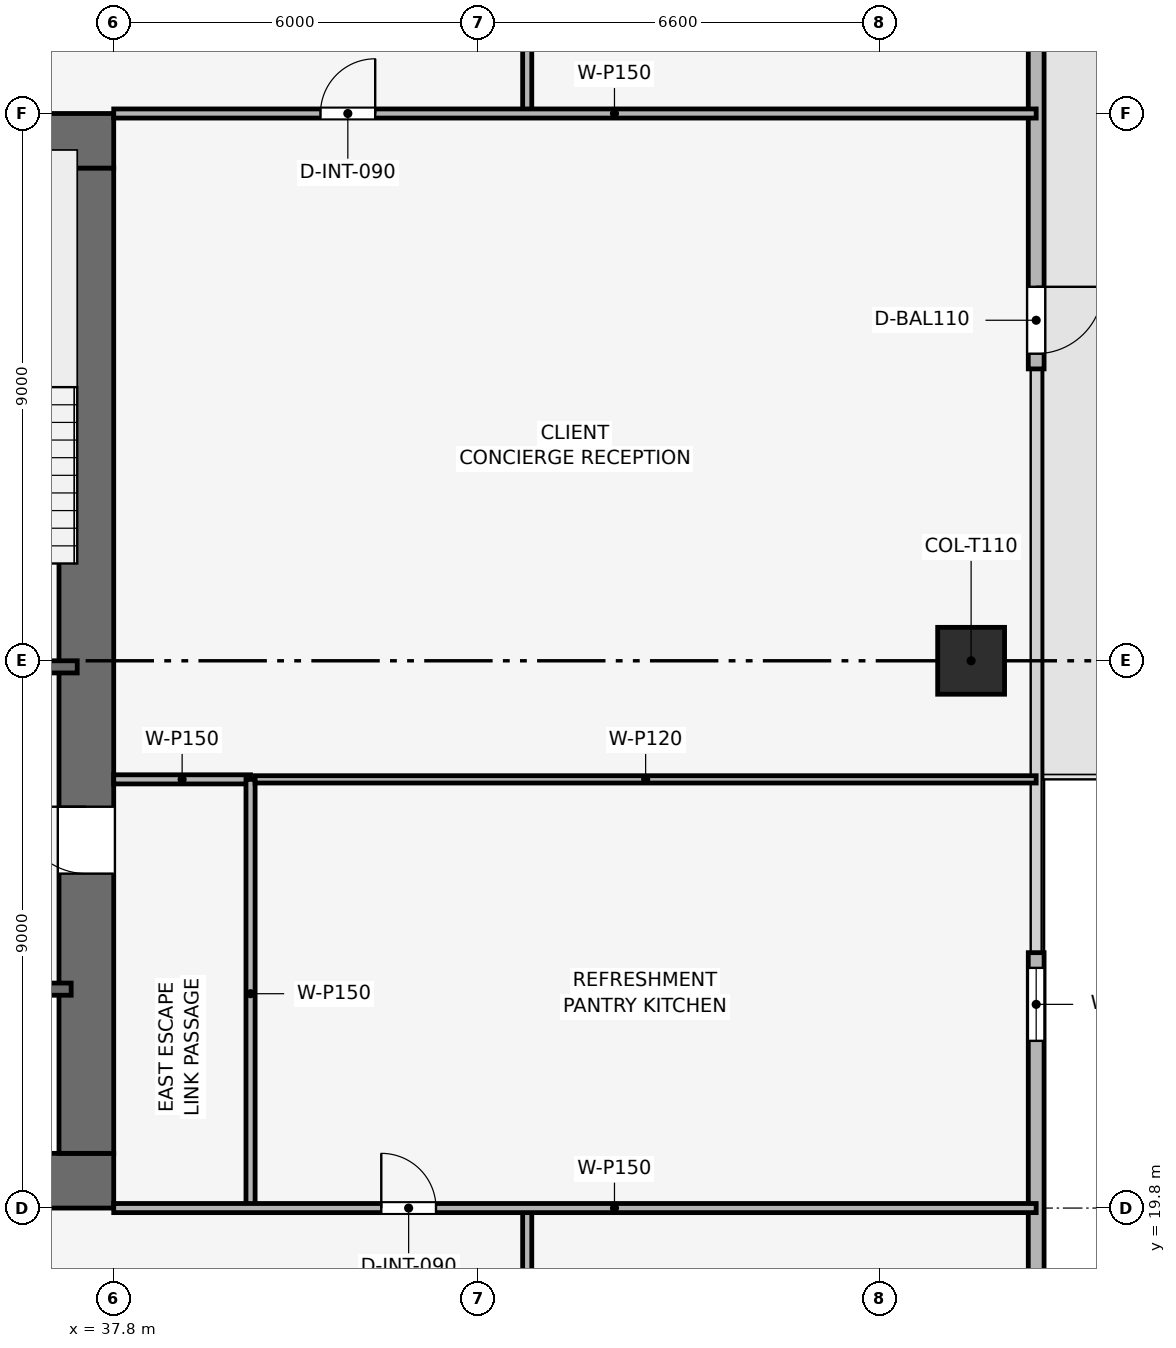
"""IFC4 building model, lengths in metres.
Left out: names, types, materials, properties, quantities, classifications, styles, units other than length and angle.
Written with IfcOpenShell. Run it as: python <this file> out.ifc"""

import sys

from ifc_helpers import new_model, si_unit, direction, frame, frame_2d, origin, origin_2d, place, context, subcontext, project, spatial, rectangle, extrude, element, fill, save


model = new_model("IFC4")
c1 = context("Model", 3, precision=1e-05, world=origin(), true_north=direction((0.0, 1.0)))
c2 = subcontext(c1, "Body", "Model", "MODEL_VIEW")
j1 = project(units=[si_unit("LENGTHUNIT", "METRE"), si_unit("PLANEANGLEUNIT", "RADIAN")], contexts=[c1])
p1 = place(None, origin())
s1 = spatial("IfcSite", under=j1, at=p1, CompositionType="ELEMENT")
p2 = place(p1, origin())
s2 = spatial("IfcBuilding", under=s1, at=p2, CompositionType="ELEMENT")
p3 = place(p2, frame((0.0, 0.0, 175.8)))
s3 = spatial("IfcBuildingStorey", under=s2, at=p3, CompositionType="ELEMENT", Elevation=175.8)
p4 = place(p3, frame((19.8, 20.25, 0.0), z_axis=(0.0, 0.0, 1.0), x_axis=(1.0, 0.0, 0.0)))
e1 = element("IfcWall", 1, at=p4, inside=s3, PredefinedType="SHEAR", context=c2, shape_type="SweptSolid", body=[
    extrude(rectangle(XDim=18.0, YDim=0.9, at=frame_2d((9.0, 0.0))), origin(), (0.0, 0.0, 1.0), 3.75),
])
p5 = place(p4, frame((8.4, 0.0, 0.0)))
e2 = element("IfcOpeningElement", 2, at=p5, cuts=e1, PredefinedType="OPENING", context=c2, shape_type="SweptSolid", body=[
    extrude(rectangle(XDim=1.2, YDim=2.2, at=frame_2d((0.6, 1.1))), frame((0.0, 0.46, 0.0), z_axis=(0.0, -1.0, 0.0), x_axis=(1.0, 0.0, 0.0)), (0.0, 0.0, 1.0), 0.92),
])
p6 = place(p3, frame((19.8, 37.35, 0.0), z_axis=(0.0, 0.0, 1.0), x_axis=(1.0, 0.0, 0.0)))
e3 = element("IfcWall", 3, at=p6, inside=s3, PredefinedType="SHEAR", context=c2, shape_type="SweptSolid", body=[
    extrude(rectangle(XDim=18.0, YDim=0.9, at=frame_2d((9.0, 0.0))), origin(), (0.0, 0.0, 1.0), 3.75),
])
p7 = place(p6, frame((7.05, 0.0, 0.0)))
e4 = element("IfcOpeningElement", 4, at=p7, cuts=e3, PredefinedType="OPENING", context=c2, shape_type="SweptSolid", body=[
    extrude(rectangle(XDim=1.1, YDim=2.15, at=frame_2d((0.55, 1.075))), frame((0.0, 0.46, 0.0), z_axis=(0.0, -1.0, 0.0), x_axis=(1.0, 0.0, 0.0)), (0.0, 0.0, 1.0), 0.92),
])
p8 = place(p3, frame((37.35, 20.7, 0.0), z_axis=(0.0, 0.0, 1.0), x_axis=(0.0, 1.0, 0.0)))
e5 = element("IfcWall", 5, at=p8, inside=s3, PredefinedType="SHEAR", context=c2, shape_type="SweptSolid", body=[
    extrude(rectangle(XDim=16.2, YDim=0.9, at=frame_2d((8.1, 0.0))), origin(), (0.0, 0.0, 1.0), 3.75),
])
p9 = place(p8, frame((4.6, 0.0, 0.0)))
e6 = element("IfcOpeningElement", 6, at=p9, cuts=e5, PredefinedType="OPENING", context=c2, shape_type="SweptSolid", body=[
    extrude(rectangle(XDim=1.1, YDim=2.15, at=frame_2d((0.55, 1.075))), frame((0.0, 0.46, 0.0), z_axis=(0.0, -1.0, 0.0), x_axis=(1.0, 0.0, 0.0)), (0.0, 0.0, 1.0), 0.92),
])
p10 = place(p3, frame((51.9, 28.8, 0.003), z_axis=(0.0, 0.0, 1.0), x_axis=(1.0, 0.0, 0.0)))
e7 = element("IfcColumn", 7, at=p10, inside=s3, PredefinedType="COLUMN", context=c2, shape_type="SweptSolid", body=[
    extrude(rectangle(XDim=1.1, YDim=1.1, at=origin_2d()), origin(), (0.0, 0.0, 1.0), 3.489),
])
p11 = place(p3, frame((52.97, 46.2, 0.0), z_axis=(0.0, 0.0, 1.0), x_axis=(0.0, -1.0, 0.0)))
e8 = element("IfcWall", 8, at=p11, inside=s3, PredefinedType="SOLIDWALL", context=c2, shape_type="SweptSolid", body=[
    extrude(rectangle(XDim=12.6, YDim=0.26, at=frame_2d((6.3, 0.0))), origin(), (0.0, 0.0, 1.0), 3.495),
])
p12 = place(p11, frame((11.25, 0.0, 0.0)))
e9 = element("IfcOpeningElement", 9, at=p12, cuts=e8, PredefinedType="OPENING", context=c2, shape_type="SweptSolid", body=[
    extrude(rectangle(XDim=1.1, YDim=2.2, at=frame_2d((0.55, 1.1))), frame((0.0, 0.14, 0.0), z_axis=(0.0, -1.0, 0.0), x_axis=(1.0, 0.0, 0.0)), (0.0, 0.0, 1.0), 0.28),
])
p13 = place(p3, frame((52.97, 24.0, 0.0), z_axis=(0.0, 0.0, 1.0), x_axis=(0.0, -1.0, 0.0)))
e10 = element("IfcWall", 10, at=p13, inside=s3, PredefinedType="SOLIDWALL", context=c2, shape_type="SweptSolid", body=[
    extrude(rectangle(XDim=12.6, YDim=0.26, at=frame_2d((6.3, 0.0))), origin(), (0.0, 0.0, 1.0), 3.495),
])
p14 = place(p13, frame((0.25, 0.0, 0.9)))
e11 = element("IfcOpeningElement", 11, at=p14, cuts=e10, PredefinedType="OPENING", context=c2, shape_type="SweptSolid", body=[
    extrude(rectangle(XDim=1.2, YDim=2.1, at=frame_2d((0.6, 1.05))), frame((0.0, 0.14, 0.0), z_axis=(0.0, -1.0, 0.0), x_axis=(1.0, 0.0, 0.0)), (0.0, 0.0, 1.0), 0.28),
])
p15 = place(p3, frame((34.05, 28.7, 0.0), z_axis=(0.0, 0.0, 1.0), x_axis=(1.0, 0.0, 0.0)))
e12 = element("IfcWall", 12, at=p15, inside=s3, PredefinedType="SHEAR", context=c2, shape_type="SweptSolid", body=[
    extrude(rectangle(XDim=3.15, YDim=0.2, at=frame_2d((1.575, 0.0))), origin(), (0.0, 0.0, 1.0), 3.495),
])
p16 = place(p15, frame((0.8, 0.0, 0.0)))
e13 = element("IfcOpeningElement", 13, at=p16, cuts=e12, PredefinedType="OPENING", context=c2, shape_type="SweptSolid", body=[
    extrude(rectangle(XDim=1.0, YDim=2.1, at=frame_2d((0.5, 1.05))), frame((0.0, 0.11, 0.0), z_axis=(0.0, -1.0, 0.0), x_axis=(1.0, 0.0, 0.0)), (0.0, 0.0, 1.0), 0.22),
])
p17 = place(p3, frame((34.05, 23.4, 0.0), z_axis=(0.0, 0.0, 1.0), x_axis=(1.0, 0.0, 0.0)))
e14 = element("IfcWall", 14, at=p17, inside=s3, PredefinedType="SHEAR", context=c2, shape_type="SweptSolid", body=[
    extrude(rectangle(XDim=3.05, YDim=0.2, at=frame_2d((1.525, 0.0))), origin(), (0.0, 0.0, 1.0), 3.495),
])
p18 = place(p17, frame((1.2, 0.0, 0.0)))
e15 = element("IfcOpeningElement", 15, at=p18, cuts=e14, PredefinedType="OPENING", context=c2, shape_type="SweptSolid", body=[
    extrude(rectangle(XDim=1.1, YDim=2.15, at=frame_2d((0.55, 1.075))), frame((0.0, 0.11, 0.0), z_axis=(0.0, -1.0, 0.0), x_axis=(1.0, 0.0, 0.0)), (0.0, 0.0, 1.0), 0.22),
])
p19 = place(p3, frame((37.8, 26.85, 0.0), z_axis=(0.0, 0.0, 1.0), x_axis=(1.0, 0.0, 0.0)))
e16 = element("IfcWall", 16, at=p19, inside=s3, PredefinedType="PARTITIONING", context=c2, shape_type="SweptSolid", body=[
    extrude(rectangle(XDim=2.25, YDim=0.15, at=frame_2d((1.125, 0.0))), origin(), (0.0, 0.0, 1.0), 3.495),
])
p20 = place(p3, frame((40.05, 19.8, 0.0), z_axis=(0.0, 0.0, 1.0), x_axis=(0.0, 1.0, 0.0)))
e17 = element("IfcWall", 17, at=p20, inside=s3, PredefinedType="PARTITIONING", context=c2, shape_type="SweptSolid", body=[
    extrude(rectangle(XDim=7.05, YDim=0.15, at=frame_2d((3.525, 0.0))), origin(), (0.0, 0.0, 1.0), 3.03),
])
p21 = place(p3, frame((40.125, 26.85, 0.0), z_axis=(0.0, 0.0, 1.0), x_axis=(1.0, 0.0, 0.0)))
e18 = element("IfcWall", 18, at=p21, inside=s3, PredefinedType="PARTITIONING", context=c2, shape_type="SweptSolid", body=[
    extrude(rectangle(XDim=12.845, YDim=0.12, at=frame_2d((6.422, 0.0))), origin(), (0.0, 0.0, 1.0), 2.98),
])
p22 = place(p3, frame((44.6, 17.4, 0.0), z_axis=(0.0, 0.0, 1.0), x_axis=(0.0, 1.0, 0.0)))
e19 = element("IfcWall", 19, at=p22, inside=s3, PredefinedType="PARTITIONING", context=c2, shape_type="SweptSolid", body=[
    extrude(rectangle(XDim=2.4, YDim=0.15, at=frame_2d((1.2, 0.0))), origin(), (0.0, 0.0, 1.0), 3.495),
])
p23 = place(p3, frame((44.6, 37.8, 0.0), z_axis=(0.0, 0.0, 1.0), x_axis=(0.0, 1.0, 0.0)))
e20 = element("IfcWall", 20, at=p23, inside=s3, PredefinedType="PARTITIONING", context=c2, shape_type="SweptSolid", body=[
    extrude(rectangle(XDim=2.4, YDim=0.15, at=frame_2d((1.2, 0.0))), origin(), (0.0, 0.0, 1.0), 3.495),
])
p24 = place(p3, frame((37.8, 19.8, 0.0), z_axis=(0.0, 0.0, 1.0), x_axis=(1.0, 0.0, 0.0)))
e21 = element("IfcWall", 21, at=p24, inside=s3, PredefinedType="PARTITIONING", context=c2, shape_type="SweptSolid", body=[
    extrude(rectangle(XDim=15.17, YDim=0.15, at=frame_2d((7.585, 0.0))), origin(), (0.0, 0.0, 1.0), 2.98),
])
p25 = place(p24, frame((4.4, 0.0, 0.0)))
e22 = element("IfcOpeningElement", 22, at=p25, cuts=e21, PredefinedType="OPENING", context=c2, shape_type="SweptSolid", body=[
    extrude(rectangle(XDim=0.9, YDim=2.1, at=frame_2d((0.45, 1.05))), frame((0.0, 0.085, 0.0), z_axis=(0.0, -1.0, 0.0), x_axis=(1.0, 0.0, 0.0)), (0.0, 0.0, 1.0), 0.17),
])
p26 = place(p3, frame((37.8, 37.8, 0.0), z_axis=(0.0, 0.0, 1.0), x_axis=(1.0, 0.0, 0.0)))
e23 = element("IfcWall", 23, at=p26, inside=s3, PredefinedType="PARTITIONING", context=c2, shape_type="SweptSolid", body=[
    extrude(rectangle(XDim=15.17, YDim=0.15, at=frame_2d((7.585, 0.0))), origin(), (0.0, 0.0, 1.0), 2.98),
])
p27 = place(p26, frame((3.4, 0.0, 0.0)))
e24 = element("IfcOpeningElement", 24, at=p27, cuts=e23, PredefinedType="OPENING", context=c2, shape_type="SweptSolid", body=[
    extrude(rectangle(XDim=0.9, YDim=2.1, at=frame_2d((0.45, 1.05))), frame((0.0, 0.085, 0.0), z_axis=(0.0, -1.0, 0.0), x_axis=(1.0, 0.0, 0.0)), (0.0, 0.0, 1.0), 0.17),
])
p28 = place(p12, origin())
e25 = element("IfcDoor", 25, at=p28, inside=s3, OperationType="SINGLE_SWING_LEFT", PredefinedType="DOOR", context=c2, shape_type="SweptSolid", body=[
    extrude(rectangle(XDim=1.1, YDim=2.2, at=frame_2d((0.55, 1.1))), frame((0.0, 0.025, 0.0), z_axis=(0.0, -1.0, 0.0), x_axis=(1.0, 0.0, 0.0)), (0.0, 0.0, 1.0), 0.05),
])
fill(e9, e25)
p29 = place(p14, origin())
e26 = element("IfcWindow", 26, at=p29, inside=s3, PartitioningType="SINGLE_PANEL", PredefinedType="WINDOW", context=c2, shape_type="SweptSolid", body=[
    extrude(rectangle(XDim=1.2, YDim=2.1, at=frame_2d((0.6, 1.05))), frame((0.0, 0.03, 0.0), z_axis=(0.0, -1.0, 0.0), x_axis=(1.0, 0.0, 0.0)), (0.0, 0.0, 1.0), 0.06),
])
fill(e11, e26)
p30 = place(p25, origin())
e27 = element("IfcDoor", 27, at=p30, inside=s3, OperationType="SINGLE_SWING_LEFT", PredefinedType="DOOR", context=c2, shape_type="SweptSolid", body=[
    extrude(rectangle(XDim=0.9, YDim=2.1, at=frame_2d((0.45, 1.05))), frame((0.0, 0.025, 0.0), z_axis=(0.0, -1.0, 0.0), x_axis=(1.0, 0.0, 0.0)), (0.0, 0.0, 1.0), 0.05),
])
fill(e22, e27)
p31 = place(p27, origin())
e28 = element("IfcDoor", 28, at=p31, inside=s3, OperationType="SINGLE_SWING_RIGHT", PredefinedType="DOOR", context=c2, shape_type="SweptSolid", body=[
    extrude(rectangle(XDim=0.9, YDim=2.1, at=frame_2d((0.45, 1.05))), frame((0.0, 0.025, 0.0), z_axis=(0.0, -1.0, 0.0), x_axis=(1.0, 0.0, 0.0)), (0.0, 0.0, 1.0), 0.05),
])
fill(e24, e28)
p32 = place(p9, origin())
e29 = element("IfcDoor", 29, at=p32, inside=s3, OperationType="SINGLE_SWING_RIGHT", PredefinedType="DOOR", context=c2, shape_type="SweptSolid", body=[
    extrude(rectangle(XDim=1.1, YDim=2.15, at=frame_2d((0.55, 1.075))), frame((0.0, 0.025, 0.0), z_axis=(0.0, -1.0, 0.0), x_axis=(1.0, 0.0, 0.0)), (0.0, 0.0, 1.0), 0.05),
])
fill(e6, e29)
save(model, sys.argv[1])
